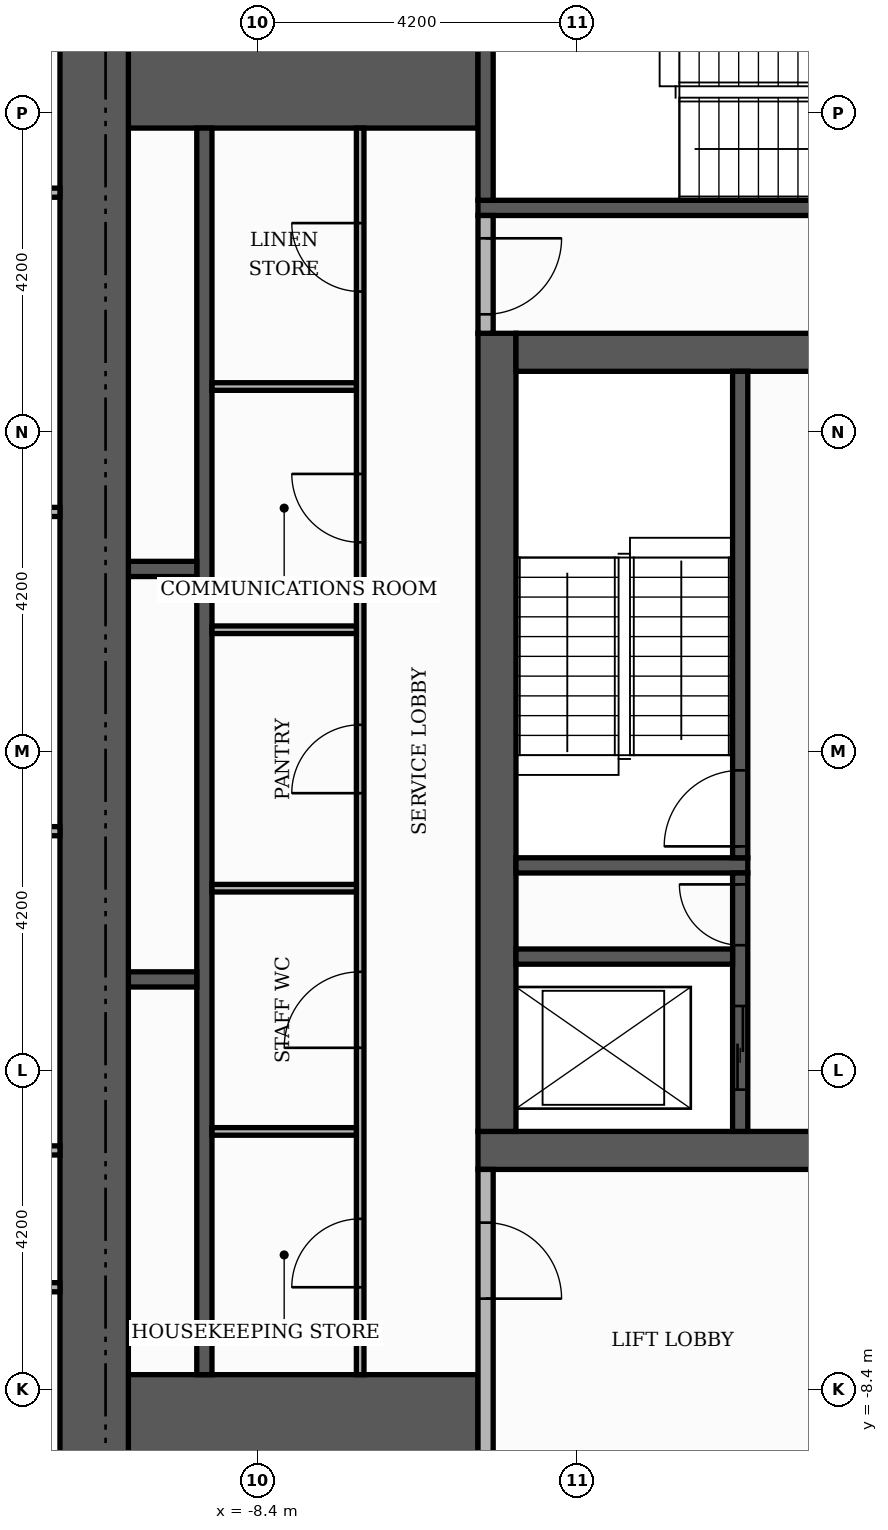
"""IFC4 building model, lengths in metres.
Left out: names, types, materials, properties, quantities, classifications, styles, units other than length and angle.
Written with IfcOpenShell. Run it as: python <this file> out.ifc"""

import sys

from ifc_helpers import new_model, si_unit, direction, frame, frame_2d, origin, place, context, subcontext, project, spatial, rectangle, extrude, element, fill, save


model = new_model("IFC4")
c1 = context("Model", 3, precision=1e-05, world=origin(), true_north=direction((0.0, 1.0)))
c2 = subcontext(c1, "Body", "Model", "MODEL_VIEW")
j1 = project(units=[si_unit("LENGTHUNIT", "METRE"), si_unit("PLANEANGLEUNIT", "RADIAN")], contexts=[c1])
p1 = place(None, origin())
s1 = spatial("IfcSite", under=j1, at=p1, CompositionType="ELEMENT")
p2 = place(p1, origin())
s2 = spatial("IfcBuilding", under=s1, at=p2, CompositionType="ELEMENT")
p3 = place(p2, frame((0.0, 0.0, 264.0)))
s3 = spatial("IfcBuildingStorey", under=s2, at=p3, CompositionType="ELEMENT", Elevation=264.0)
p4 = place(p3, frame((-5.5, -5.25, 0.0), z_axis=(0.0, 0.0, 1.0), x_axis=(1.0, 0.0, 0.0)))
e1 = element("IfcWall", 1, at=p4, inside=s3, PredefinedType="SHEAR", context=c2, shape_type="SweptSolid", body=[
    extrude(rectangle(XDim=11.0, YDim=0.5, at=frame_2d((5.5, 0.0))), origin(), (0.0, 0.0, 1.0), 3.48),
])
p5 = place(p4, frame((4.9, 0.0, 0.0)))
e2 = element("IfcOpeningElement", 2, at=p5, cuts=e1, PredefinedType="OPENING", context=c2, shape_type="SweptSolid", body=[
    extrude(rectangle(XDim=1.2, YDim=2.1, at=frame_2d((0.6, 1.05))), frame((0.0, 0.26, 0.0), z_axis=(0.0, -1.0, 0.0), x_axis=(1.0, 0.0, 0.0)), (0.0, 0.0, 1.0), 0.52),
])
p6 = place(p3, frame((-5.25, -5.0, 0.0), z_axis=(0.0, 0.0, 1.0), x_axis=(0.0, 1.0, 0.0)))
e3 = element("IfcWall", 3, at=p6, inside=s3, PredefinedType="SHEAR", context=c2, shape_type="SweptSolid", body=[
    extrude(rectangle(XDim=10.5, YDim=0.5, at=frame_2d((5.25, 0.0))), origin(), (0.0, 0.0, 1.0), 3.48),
])
p7 = place(p3, frame((-5.0, 5.25, 0.0), z_axis=(0.0, 0.0, 1.0), x_axis=(1.0, 0.0, 0.0)))
e4 = element("IfcWall", 4, at=p7, inside=s3, PredefinedType="SHEAR", context=c2, shape_type="SweptSolid", body=[
    extrude(rectangle(XDim=10.0, YDim=0.5, at=frame_2d((5.0, 0.0))), origin(), (0.0, 0.0, 1.0), 3.48),
])
p8 = place(p7, frame((4.4, 0.0, 0.0)))
e5 = element("IfcOpeningElement", 5, at=p8, cuts=e4, PredefinedType="OPENING", context=c2, shape_type="SweptSolid", body=[
    extrude(rectangle(XDim=1.2, YDim=2.1, at=frame_2d((0.6, 1.05))), frame((0.0, 0.26, 0.0), z_axis=(0.0, -1.0, 0.0), x_axis=(1.0, 0.0, 0.0)), (0.0, 0.0, 1.0), 0.52),
])
for number, where, z_axis, x_axis in (
    (6, (-10.1, -9.15, 0.0), (0.0, 0.0, 1.0), (1.0, 0.0, 0.0)),
    (7, (-10.1, 9.15, 0.0), (0.0, 0.0, 1.0), (1.0, 0.0, 0.0)),
):
    element("IfcWall", number, at=place(p3, frame(where, z_axis=z_axis, x_axis=x_axis)), inside=s3, PredefinedType="SHEAR", context=c2, shape_type="SweptSolid", body=[
        extrude(rectangle(XDim=4.6, YDim=1.9, at=frame_2d((2.3, 0.0))), origin(), (0.0, 0.0, 1.0), 3.48),
    ])
p9 = place(p3, frame((-5.0, -1.5, 0.0), z_axis=(0.0, 0.0, 1.0), x_axis=(1.0, 0.0, 0.0)))
e8 = element("IfcWall", 8, at=p9, inside=s3, PredefinedType="SHEAR", context=c2, shape_type="SweptSolid", body=[
    extrude(rectangle(XDim=3.05, YDim=0.2, at=frame_2d((1.525, 0.0))), origin(), (0.0, 0.0, 1.0), 3.48),
])
p10 = place(p3, frame((-2.05, -1.4, 0.0), z_axis=(0.0, 0.0, 1.0), x_axis=(0.0, 1.0, 0.0)))
e9 = element("IfcWall", 9, at=p10, inside=s3, PredefinedType="SHEAR", context=c2, shape_type="SweptSolid", body=[
    extrude(rectangle(XDim=6.4, YDim=0.2, at=frame_2d((3.2, 0.0))), origin(), (0.0, 0.0, 1.0), 3.48),
])
p11 = place(p10, frame((0.15, 0.0, 0.0)))
e10 = element("IfcOpeningElement", 10, at=p11, cuts=e9, PredefinedType="OPENING", context=c2, shape_type="SweptSolid", body=[
    extrude(rectangle(XDim=1.0, YDim=2.1, at=frame_2d((0.5, 1.05))), frame((0.0, 0.11, 0.0), z_axis=(0.0, -1.0, 0.0), x_axis=(1.0, 0.0, 0.0)), (0.0, 0.0, 1.0), 0.22),
])
p12 = place(p3, frame((-5.5, 7.15, 0.0), z_axis=(0.0, 0.0, 1.0), x_axis=(1.0, 0.0, 0.0)))
e11 = element("IfcWall", 11, at=p12, inside=s3, PredefinedType="SHEAR", context=c2, shape_type="SweptSolid", body=[
    extrude(rectangle(XDim=6.8, YDim=0.2, at=frame_2d((3.4, 0.0))), origin(), (0.0, 0.0, 1.0), 3.48),
])
p13 = place(p3, frame((-5.4, 7.25, 0.0), z_axis=(0.0, 0.0, 1.0), x_axis=(0.0, 1.0, 0.0)))
e12 = element("IfcWall", 12, at=p13, inside=s3, PredefinedType="SHEAR", context=c2, shape_type="SweptSolid", body=[
    extrude(rectangle(XDim=2.85, YDim=0.2, at=frame_2d((1.425, 0.0))), origin(), (0.0, 0.0, 1.0), 3.48),
])
p14 = place(p3, frame((-9.1, -8.2, 0.0), z_axis=(0.0, 0.0, 1.0), x_axis=(0.0, 1.0, 0.0)))
e13 = element("IfcWall", 13, at=p14, inside=s3, PredefinedType="SHEAR", context=c2, shape_type="SweptSolid", body=[
    extrude(rectangle(XDim=16.4, YDim=0.2, at=frame_2d((8.2, 0.0))), origin(), (0.0, 0.0, 1.0), 3.48),
])
p15 = place(p3, frame((-2.05, -5.0, 0.0), z_axis=(0.0, 0.0, 1.0), x_axis=(0.0, 1.0, 0.0)))
e14 = element("IfcWall", 14, at=p15, inside=s3, PredefinedType="SHEAR", context=c2, shape_type="SweptSolid", body=[
    extrude(rectangle(XDim=3.4, YDim=0.2, at=frame_2d((1.7, 0.0))), origin(), (0.0, 0.0, 1.0), 3.48),
])
p16 = place(p15, frame((0.55, 0.0, 0.0)))
e15 = element("IfcOpeningElement", 15, at=p16, cuts=e14, PredefinedType="OPENING", context=c2, shape_type="SweptSolid", body=[
    extrude(rectangle(XDim=1.1, YDim=2.1, at=frame_2d((0.55, 1.05))), frame((0.0, 0.11, 0.0), z_axis=(0.0, -1.0, 0.0), x_axis=(1.0, 0.0, 0.0)), (0.0, 0.0, 1.0), 0.22),
])
p17 = place(p15, frame((2.45, 0.0, 0.0)))
e16 = element("IfcOpeningElement", 16, at=p17, cuts=e14, PredefinedType="OPENING", context=c2, shape_type="SweptSolid", body=[
    extrude(rectangle(XDim=0.8, YDim=2.1, at=frame_2d((0.4, 1.05))), frame((0.0, 0.11, 0.0), z_axis=(0.0, -1.0, 0.0), x_axis=(1.0, 0.0, 0.0)), (0.0, 0.0, 1.0), 0.22),
])
p18 = place(p3, frame((-10.1, -3.0, 0.0), z_axis=(0.0, 0.0, 1.0), x_axis=(1.0, 0.0, 0.0)))
e17 = element("IfcWall", 17, at=p18, inside=s3, PredefinedType="SHEAR", context=c2, shape_type="SweptSolid", body=[
    extrude(rectangle(XDim=0.9, YDim=0.2, at=frame_2d((0.45, 0.0))), origin(), (0.0, 0.0, 1.0), 3.48),
])
p19 = place(p3, frame((-5.0, -2.7, 0.0), z_axis=(0.0, 0.0, 1.0), x_axis=(1.0, 0.0, 0.0)))
e18 = element("IfcWall", 18, at=p19, inside=s3, PredefinedType="SHEAR", context=c2, shape_type="SweptSolid", body=[
    extrude(rectangle(XDim=2.85, YDim=0.2, at=frame_2d((1.425, 0.0))), origin(), (0.0, 0.0, 1.0), 3.48),
])
p20 = place(p3, frame((-10.1, 2.4, 0.0), z_axis=(0.0, 0.0, 1.0), x_axis=(1.0, 0.0, 0.0)))
e19 = element("IfcWall", 19, at=p20, inside=s3, PredefinedType="SHEAR", context=c2, shape_type="SweptSolid", body=[
    extrude(rectangle(XDim=0.9, YDim=0.2, at=frame_2d((0.45, 0.0))), origin(), (0.0, 0.0, 1.0), 3.48),
])
p21 = place(p3, frame((-10.55, -10.1, 0.0), z_axis=(0.0, 0.0, 1.0), x_axis=(0.0, 1.0, 0.0)))
e20 = element("IfcWall", 20, at=p21, inside=s3, PredefinedType="SHEAR", context=c2, shape_type="SweptSolid", body=[
    extrude(rectangle(XDim=20.2, YDim=0.9, at=frame_2d((10.1, 0.0))), origin(), (0.0, 0.0, 1.0), 3.48),
])
p22 = place(p3, frame((-5.4, -10.1, 0.0), z_axis=(0.0, 0.0, 1.0), x_axis=(0.0, 1.0, 0.0)))
e21 = element("IfcWall", 21, at=p22, inside=s3, PredefinedType="PARTITIONING", context=c2, shape_type="SweptSolid", body=[
    extrude(rectangle(XDim=4.6, YDim=0.2, at=frame_2d((2.3, 0.0))), origin(), (0.0, 0.0, 1.0), 3.48),
])
p23 = place(p22, frame((2.9, 0.0, 0.0)))
e22 = element("IfcOpeningElement", 22, at=p23, cuts=e21, PredefinedType="OPENING", context=c2, shape_type="SweptSolid", body=[
    extrude(rectangle(XDim=1.0, YDim=2.1, at=frame_2d((0.5, 1.05))), frame((0.0, 0.11, 0.0), z_axis=(0.0, -1.0, 0.0), x_axis=(1.0, 0.0, 0.0)), (0.0, 0.0, 1.0), 0.22),
])
p24 = place(p3, frame((-7.05, -8.2, 0.0), z_axis=(0.0, 0.0, 1.0), x_axis=(0.0, 1.0, 0.0)))
e23 = element("IfcWall", 23, at=p24, inside=s3, PredefinedType="PARTITIONING", context=c2, shape_type="SweptSolid", body=[
    extrude(rectangle(XDim=16.4, YDim=0.1, at=frame_2d((8.2, 0.0))), origin(), (0.0, 0.0, 1.0), 3.48),
])
p25 = place(p24, frame((1.15, 0.0, 0.0)))
e24 = element("IfcOpeningElement", 24, at=p25, cuts=e23, PredefinedType="OPENING", context=c2, shape_type="SweptSolid", body=[
    extrude(rectangle(XDim=0.9, YDim=2.1, at=frame_2d((0.45, 1.05))), frame((0.0, 0.06, 0.0), z_axis=(0.0, -1.0, 0.0), x_axis=(1.0, 0.0, 0.0)), (0.0, 0.0, 1.0), 0.12),
])
p26 = place(p24, frame((4.3, 0.0, 0.0)))
e25 = element("IfcOpeningElement", 25, at=p26, cuts=e23, PredefinedType="OPENING", context=c2, shape_type="SweptSolid", body=[
    extrude(rectangle(XDim=1.0, YDim=2.1, at=frame_2d((0.5, 1.05))), frame((0.0, 0.06, 0.0), z_axis=(0.0, -1.0, 0.0), x_axis=(1.0, 0.0, 0.0)), (0.0, 0.0, 1.0), 0.12),
])
p27 = place(p24, frame((7.65, 0.0, 0.0)))
e26 = element("IfcOpeningElement", 26, at=p27, cuts=e23, PredefinedType="OPENING", context=c2, shape_type="SweptSolid", body=[
    extrude(rectangle(XDim=0.9, YDim=2.1, at=frame_2d((0.45, 1.05))), frame((0.0, 0.06, 0.0), z_axis=(0.0, -1.0, 0.0), x_axis=(1.0, 0.0, 0.0)), (0.0, 0.0, 1.0), 0.12),
])
p28 = place(p24, frame((10.95, 0.0, 0.0)))
e27 = element("IfcOpeningElement", 27, at=p28, cuts=e23, PredefinedType="OPENING", context=c2, shape_type="SweptSolid", body=[
    extrude(rectangle(XDim=0.9, YDim=2.1, at=frame_2d((0.45, 1.05))), frame((0.0, 0.06, 0.0), z_axis=(0.0, -1.0, 0.0), x_axis=(1.0, 0.0, 0.0)), (0.0, 0.0, 1.0), 0.12),
])
p29 = place(p24, frame((14.25, 0.0, 0.0)))
e28 = element("IfcOpeningElement", 28, at=p29, cuts=e23, PredefinedType="OPENING", context=c2, shape_type="SweptSolid", body=[
    extrude(rectangle(XDim=0.9, YDim=2.1, at=frame_2d((0.45, 1.05))), frame((0.0, 0.06, 0.0), z_axis=(0.0, -1.0, 0.0), x_axis=(1.0, 0.0, 0.0)), (0.0, 0.0, 1.0), 0.12),
])
for number, where, z_axis, x_axis in (
    (29, (-9.0, -5.0, 0.0), (0.0, 0.0, 1.0), (1.0, 0.0, 0.0)),
    (30, (-9.0, -1.8, 0.0), (0.0, 0.0, 1.0), (1.0, 0.0, 0.0)),
    (31, (-9.0, 1.6, 0.0), (0.0, 0.0, 1.0), (1.0, 0.0, 0.0)),
    (32, (-9.0, 4.8, 0.0), (0.0, 0.0, 1.0), (1.0, 0.0, 0.0)),
):
    element("IfcWall", number, at=place(p3, frame(where, z_axis=z_axis, x_axis=x_axis)), inside=s3, PredefinedType="PARTITIONING", context=c2, shape_type="SweptSolid", body=[
        extrude(rectangle(XDim=1.9, YDim=0.1, at=frame_2d((0.95, 0.0))), origin(), (0.0, 0.0, 1.0), 3.48),
    ])
p30 = place(p3, frame((-5.4, 5.5, 0.0), z_axis=(0.0, 0.0, 1.0), x_axis=(0.0, 1.0, 0.0)))
e33 = element("IfcWall", 33, at=p30, inside=s3, PredefinedType="PARTITIONING", context=c2, shape_type="SweptSolid", body=[
    extrude(rectangle(XDim=1.55, YDim=0.2, at=frame_2d((0.775, 0.0))), origin(), (0.0, 0.0, 1.0), 3.48),
])
p31 = place(p30, frame((0.25, 0.0, 0.0)))
e34 = element("IfcOpeningElement", 34, at=p31, cuts=e33, PredefinedType="OPENING", context=c2, shape_type="SweptSolid", body=[
    extrude(rectangle(XDim=1.0, YDim=2.1, at=frame_2d((0.5, 1.05))), frame((0.0, 0.11, 0.0), z_axis=(0.0, -1.0, 0.0), x_axis=(1.0, 0.0, 0.0)), (0.0, 0.0, 1.0), 0.22),
])
for number, where, z_axis, x_axis in (
    (35, (-18.92, -7.05, 0.0), (0.0, 0.0, 1.0), (1.0, 0.0, 0.0)),
    (36, (-18.92, -5.25, 0.0), (0.0, 0.0, 1.0), (1.0, 0.0, 0.0)),
    (37, (-18.92, -1.05, 0.0), (0.0, 0.0, 1.0), (1.0, 0.0, 0.0)),
    (38, (-18.92, 3.15, 0.0), (0.0, 0.0, 1.0), (1.0, 0.0, 0.0)),
):
    element("IfcWall", number, at=place(p3, frame(where, z_axis=z_axis, x_axis=x_axis)), inside=s3, PredefinedType="PARTITIONING", context=c2, shape_type="SweptSolid", body=[
        extrude(rectangle(XDim=7.92, YDim=0.12, at=frame_2d((3.96, 0.0))), origin(), (0.0, 0.0, 1.0), 3.48),
    ])
p32 = place(p3, frame((-18.92, 7.35, 0.0), z_axis=(0.0, 0.0, 1.0), x_axis=(1.0, 0.0, 0.0)))
e39 = element("IfcWall", 39, at=p32, inside=s3, PredefinedType="PARTITIONING", context=c2, shape_type="SweptSolid", body=[
    extrude(rectangle(XDim=7.92, YDim=0.12, at=frame_2d((3.96, 0.0))), origin(), (0.0, 0.0, 1.0), 3.48),
])
p33 = place(p32, frame((3.51, 0.0, 0.0)))
e40 = element("IfcOpeningElement", 40, at=p33, cuts=e39, PredefinedType="OPENING", context=c2, shape_type="SweptSolid", body=[
    extrude(rectangle(XDim=0.9, YDim=2.1, at=frame_2d((0.45, 1.05))), frame((0.0, 0.07, 0.0), z_axis=(0.0, -1.0, 0.0), x_axis=(1.0, 0.0, 0.0)), (0.0, 0.0, 1.0), 0.14),
])
p34 = place(p16, origin())
e41 = element("IfcDoor", 41, at=p34, inside=s3, OperationType="SLIDING_TO_LEFT", PredefinedType="DOOR", context=c2, shape_type="SweptSolid", body=[
    extrude(rectangle(XDim=1.1, YDim=2.1, at=frame_2d((0.55, 1.05))), frame((0.0, 0.025, 0.0), z_axis=(0.0, -1.0, 0.0), x_axis=(1.0, 0.0, 0.0)), (0.0, 0.0, 1.0), 0.05),
])
fill(e15, e41)
p35 = place(p11, origin())
e42 = element("IfcDoor", 42, at=p35, inside=s3, OperationType="SINGLE_SWING_LEFT", PredefinedType="DOOR", context=c2, shape_type="SweptSolid", body=[
    extrude(rectangle(XDim=1.0, YDim=2.1, at=frame_2d((0.5, 1.05))), frame((0.0, 0.025, 0.0), z_axis=(0.0, -1.0, 0.0), x_axis=(1.0, 0.0, 0.0)), (0.0, 0.0, 1.0), 0.05),
])
fill(e10, e42)
p36 = place(p17, origin())
e43 = element("IfcDoor", 43, at=p36, inside=s3, OperationType="SINGLE_SWING_RIGHT", PredefinedType="DOOR", context=c2, shape_type="SweptSolid", body=[
    extrude(rectangle(XDim=0.8, YDim=2.1, at=frame_2d((0.4, 1.05))), frame((0.0, 0.025, 0.0), z_axis=(0.0, -1.0, 0.0), x_axis=(1.0, 0.0, 0.0)), (0.0, 0.0, 1.0), 0.05),
])
fill(e16, e43)
p37 = place(p31, frame((1.0, 0.0, 0.0), z_axis=(0.0, 0.0, 1.0), x_axis=(-1.0, 0.0, 0.0)))
e44 = element("IfcDoor", 44, at=p37, inside=s3, OperationType="SINGLE_SWING_RIGHT", PredefinedType="DOOR", context=c2, shape_type="SweptSolid", body=[
    extrude(rectangle(XDim=1.0, YDim=2.1, at=frame_2d((0.5, 1.05))), frame((0.0, 0.025, 0.0), z_axis=(0.0, -1.0, 0.0), x_axis=(1.0, 0.0, 0.0)), (0.0, 0.0, 1.0), 0.05),
])
fill(e34, e44)
p38 = place(p23, frame((1.0, 0.0, 0.0), z_axis=(0.0, 0.0, 1.0), x_axis=(-1.0, 0.0, 0.0)))
e45 = element("IfcDoor", 45, at=p38, inside=s3, OperationType="SINGLE_SWING_LEFT", PredefinedType="DOOR", context=c2, shape_type="SweptSolid", body=[
    extrude(rectangle(XDim=1.0, YDim=2.1, at=frame_2d((0.5, 1.05))), frame((0.0, 0.025, 0.0), z_axis=(0.0, -1.0, 0.0), x_axis=(1.0, 0.0, 0.0)), (0.0, 0.0, 1.0), 0.05),
])
fill(e22, e45)
p39 = place(p25, origin())
e46 = element("IfcDoor", 46, at=p39, inside=s3, OperationType="SINGLE_SWING_LEFT", PredefinedType="DOOR", context=c2, shape_type="SweptSolid", body=[
    extrude(rectangle(XDim=0.9, YDim=2.1, at=frame_2d((0.45, 1.05))), frame((0.0, 0.025, 0.0), z_axis=(0.0, -1.0, 0.0), x_axis=(1.0, 0.0, 0.0)), (0.0, 0.0, 1.0), 0.05),
])
fill(e24, e46)
p40 = place(p26, origin())
e47 = element("IfcDoor", 47, at=p40, inside=s3, OperationType="SINGLE_SWING_LEFT", PredefinedType="DOOR", context=c2, shape_type="SweptSolid", body=[
    extrude(rectangle(XDim=1.0, YDim=2.1, at=frame_2d((0.5, 1.05))), frame((0.0, 0.025, 0.0), z_axis=(0.0, -1.0, 0.0), x_axis=(1.0, 0.0, 0.0)), (0.0, 0.0, 1.0), 0.05),
])
fill(e25, e47)
p41 = place(p27, origin())
e48 = element("IfcDoor", 48, at=p41, inside=s3, OperationType="SINGLE_SWING_LEFT", PredefinedType="DOOR", context=c2, shape_type="SweptSolid", body=[
    extrude(rectangle(XDim=0.9, YDim=2.1, at=frame_2d((0.45, 1.05))), frame((0.0, 0.025, 0.0), z_axis=(0.0, -1.0, 0.0), x_axis=(1.0, 0.0, 0.0)), (0.0, 0.0, 1.0), 0.05),
])
fill(e26, e48)
p42 = place(p28, origin())
e49 = element("IfcDoor", 49, at=p42, inside=s3, OperationType="SINGLE_SWING_RIGHT", PredefinedType="DOOR", context=c2, shape_type="SweptSolid", body=[
    extrude(rectangle(XDim=0.9, YDim=2.1, at=frame_2d((0.45, 1.05))), frame((0.0, 0.025, 0.0), z_axis=(0.0, -1.0, 0.0), x_axis=(1.0, 0.0, 0.0)), (0.0, 0.0, 1.0), 0.05),
])
fill(e27, e49)
p43 = place(p29, origin())
e50 = element("IfcDoor", 50, at=p43, inside=s3, OperationType="SINGLE_SWING_RIGHT", PredefinedType="DOOR", context=c2, shape_type="SweptSolid", body=[
    extrude(rectangle(XDim=0.9, YDim=2.1, at=frame_2d((0.45, 1.05))), frame((0.0, 0.025, 0.0), z_axis=(0.0, -1.0, 0.0), x_axis=(1.0, 0.0, 0.0)), (0.0, 0.0, 1.0), 0.05),
])
fill(e28, e50)
save(model, sys.argv[1])
